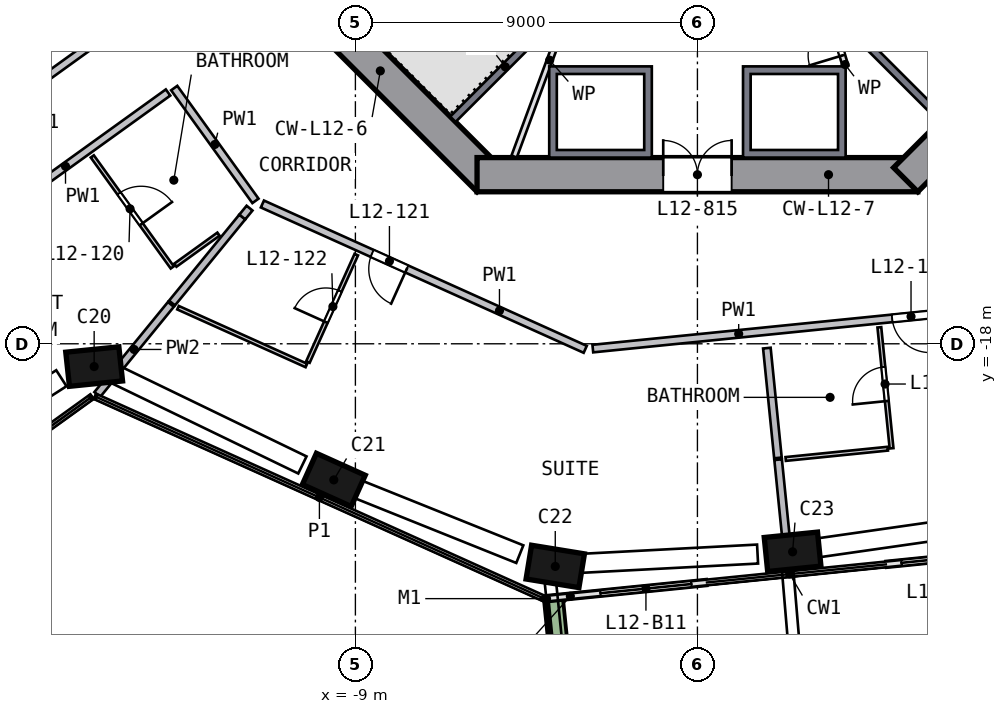
"""IFC4 building model, lengths in metres.
Left out: names, types, materials, properties, quantities, classifications, styles, units other than length and angle.
Written with IfcOpenShell. Run it as: python <this file> out.ifc"""

import sys

from ifc_helpers import new_model, si_unit, direction, frame, frame_2d, origin, origin_2d, place, context, subcontext, project, spatial, polyline, rectangle, outline, extrude, element, fill, save


model = new_model("IFC4")
c1 = context("Model", 3, precision=1e-05, world=origin(), true_north=direction((0.0, 1.0)))
c2 = subcontext(c1, "Body", "Model", "MODEL_VIEW")
j1 = project(units=[si_unit("LENGTHUNIT", "METRE"), si_unit("PLANEANGLEUNIT", "RADIAN")], contexts=[c1])
p1 = place(None, origin())
s1 = spatial("IfcSite", under=j1, at=p1, CompositionType="ELEMENT")
p2 = place(p1, origin())
s2 = spatial("IfcBuilding", under=s1, at=p2, CompositionType="ELEMENT")
p3 = place(p2, frame((0.0, 0.0, 56.5)))
s3 = spatial("IfcBuildingStorey", under=s2, at=p3, CompositionType="ELEMENT", Elevation=56.5)
p4 = place(p3, frame((-15.981, -18.509, 0.0), z_axis=(0.088633967, -0.075255255, 0.993217331), x_axis=(-0.991038531, -0.106704076, 0.080354653)))
e1 = element("IfcColumn", 1, at=p4, inside=s3, PredefinedType="COLUMN", context=c2, shape_type="SweptSolid", body=[
    extrude(rectangle(XDim=1.4, YDim=0.9, at=origin_2d()), origin(), (0.0, 0.0, 1.0), 3.212),
])
p5 = place(p3, frame((-9.693, -21.527, 0.0), z_axis=(0.102744451, -0.045250147, 0.993678017), x_axis=(0.905958686, -0.408210433, -0.112263538)))
e2 = element("IfcColumn", 2, at=p5, inside=s3, PredefinedType="COLUMN", context=c2, shape_type="SweptSolid", body=[
    extrude(rectangle(XDim=1.4, YDim=0.9, at=origin_2d()), origin(), (0.0, 0.0, 1.0), 3.21),
])
p6 = place(p3, frame((-3.878, -23.838, 0.0), z_axis=(0.113509932, -0.01748646, 0.993382967), x_axis=(-0.98048224, 0.159578304, 0.114844864)))
e3 = element("IfcColumn", 3, at=p6, inside=s3, PredefinedType="COLUMN", context=c2, shape_type="SweptSolid", body=[
    extrude(rectangle(XDim=1.4, YDim=0.9, at=origin_2d()), origin(), (0.0, 0.0, 1.0), 3.211),
])
p7 = place(p3, frame((2.369, -23.489, 0.0), z_axis=(0.111641928, 0.012168058, 0.993674), x_axis=(0.988702484, 0.09927897, -0.112299088)))
e4 = element("IfcColumn", 4, at=p7, inside=s3, PredefinedType="COLUMN", context=c2, shape_type="SweptSolid", body=[
    extrude(rectangle(XDim=1.4, YDim=0.9, at=origin_2d()), origin(), (0.0, 0.0, 1.0), 3.21),
])
p8 = place(p3, frame((-13.682, -5.481, 0.0), z_axis=(0.0, 0.0, 1.0), x_axis=(0.707106781, -0.707106781, 0.0)))
e5 = element("IfcWall", 5, at=p8, inside=s3, PredefinedType="SHEAR", context=c2, shape_type="SweptSolid", body=[
    extrude(rectangle(XDim=11.598, YDim=0.9, at=frame_2d((5.799, 0.0))), origin(), (0.0, 0.0, 1.0), 3.5),
])
p9 = place(p8, frame((2.099, 0.0, 0.0)))
e6 = element("IfcOpeningElement", 6, at=p9, cuts=e5, PredefinedType="OPENING", context=c2, shape_type="SweptSolid", body=[
    extrude(rectangle(XDim=1.2, YDim=2.1, at=frame_2d((0.6, 1.05))), frame((0.0, 0.46, 0.0), z_axis=(0.0, -1.0, 0.0), x_axis=(1.0, 0.0, 0.0)), (0.0, 0.0, 1.0), 0.92),
])
p10 = place(p3, frame((-5.799, -13.55, 0.0), z_axis=(0.0, 0.0, 1.0), x_axis=(1.0, 0.0, 0.0)))
e7 = element("IfcWall", 7, at=p10, inside=s3, PredefinedType="SHEAR", context=c2, shape_type="SweptSolid", body=[
    extrude(rectangle(XDim=11.598, YDim=0.9, at=frame_2d((5.799, 0.0))), origin(), (0.0, 0.0, 1.0), 3.5),
])
p11 = place(p10, frame((4.899, 0.0, 0.0)))
e8 = element("IfcOpeningElement", 8, at=p11, cuts=e7, PredefinedType="OPENING", context=c2, shape_type="SweptSolid", body=[
    extrude(rectangle(XDim=1.8, YDim=2.1, at=frame_2d((0.9, 1.05))), frame((0.0, 0.46, 0.0), z_axis=(0.0, -1.0, 0.0), x_axis=(1.0, 0.0, 0.0)), (0.0, 0.0, 1.0), 0.92),
])
p12 = place(p3, frame((5.481, -13.682, 0.0), z_axis=(0.0, 0.0, 1.0), x_axis=(0.707106781, 0.707106781, 0.0)))
e9 = element("IfcWall", 9, at=p12, inside=s3, PredefinedType="SHEAR", context=c2, shape_type="SweptSolid", body=[
    extrude(rectangle(XDim=11.598, YDim=0.9, at=frame_2d((5.799, 0.0))), origin(), (0.0, 0.0, 1.0), 3.5),
])
p13 = place(p12, frame((2.099, 0.0, 0.0)))
e10 = element("IfcOpeningElement", 10, at=p13, cuts=e9, PredefinedType="OPENING", context=c2, shape_type="SweptSolid", body=[
    extrude(rectangle(XDim=1.2, YDim=2.1, at=frame_2d((0.6, 1.05))), frame((0.0, 0.46, 0.0), z_axis=(0.0, -1.0, 0.0), x_axis=(1.0, 0.0, 0.0)), (0.0, 0.0, 1.0), 0.92),
])
p14 = place(p3, frame((-3.94, -24.704, 0.0), z_axis=(0.0, 0.0, 1.0), x_axis=(0.994951039, 0.100361492, 0.0)))
e11 = element("IfcWall", 11, at=p14, inside=s3, PredefinedType="SOLIDWALL", context=c2, shape_type="SweptSolid", body=[
    extrude(rectangle(XDim=4.199, YDim=0.15, at=frame_2d((2.099, 0.0))), origin(), (0.0, 0.0, 1.0), 2.425),
])
p15 = place(p14, frame((1.399, 0.0, 0.0)))
e12 = element("IfcOpeningElement", 12, at=p15, cuts=e11, PredefinedType="OPENING", context=c2, shape_type="SweptSolid", body=[
    extrude(rectangle(XDim=2.4, YDim=2.4, at=frame_2d((1.2, 1.2))), frame((0.0, 0.085, 0.0), z_axis=(0.0, -1.0, 0.0), x_axis=(1.0, 0.0, 0.0)), (0.0, 0.0, 1.0), 0.17),
])
p16 = place(p3, frame((4.972, -23.804, 0.0), z_axis=(0.0, 0.0, 1.0), x_axis=(0.994952518, 0.100346834, 0.0)))
e13 = element("IfcWall", 13, at=p16, inside=s3, PredefinedType="SOLIDWALL", context=c2, shape_type="SweptSolid", body=[
    extrude(rectangle(XDim=3.842, YDim=0.15, at=frame_2d((1.921, 0.0))), origin(), (0.0, 0.0, 1.0), 2.425),
])
p17 = place(p16, frame((0.4, 0.0, 0.0)))
e14 = element("IfcOpeningElement", 14, at=p17, cuts=e13, PredefinedType="OPENING", context=c2, shape_type="SweptSolid", body=[
    extrude(rectangle(XDim=2.4, YDim=2.4, at=frame_2d((1.2, 1.2))), frame((0.0, 0.085, 0.0), z_axis=(0.0, -1.0, 0.0), x_axis=(1.0, 0.0, 0.0)), (0.0, 0.0, 1.0), 0.17),
])
p18 = place(p3, frame((-3.784, -24.764, 0.0), z_axis=(0.0, 0.0, 1.0), x_axis=(0.100357532, -0.994951439, 0.0)))
e15 = element("IfcWall", 15, at=p18, inside=s3, PredefinedType="SOLIDWALL", context=c2, shape_type="SweptSolid", body=[
    extrude(rectangle(XDim=3.199, YDim=0.5, at=frame_2d((1.6, 0.0))), origin(), (0.0, 0.0, 1.0), 0.7),
])
p19 = place(p3, origin())
e16 = element("IfcWall", 16, at=p19, inside=s3, PredefinedType="SOLIDWALL", context=c2, shape_type="SweptSolid", body=[
    extrude(outline(polyline([(-1.2, -13.1), (-3.9, -13.1), (-3.9, -10.7), (-1.2, -10.7), (-1.2, -13.1)]), holes=[polyline([(-3.7, -10.9), (-3.7, -12.9), (-1.4, -12.9), (-1.4, -10.9), (-3.7, -10.9)])]), origin(), (0.0, 0.0, 1.0), 3.19),
])
p20 = place(p3, origin())
e17 = element("IfcWall", 17, at=p20, inside=s3, PredefinedType="SOLIDWALL", context=c2, shape_type="SweptSolid", body=[
    extrude(outline(polyline([(3.9, -10.7), (3.9, -13.1), (1.2, -13.1), (1.2, -10.7), (3.9, -10.7)]), holes=[polyline([(1.4, -12.9), (3.7, -12.9), (3.7, -10.9), (1.4, -10.9), (1.4, -12.9)])]), origin(), (0.0, 0.0, 1.0), 3.19),
])
for number, where, z_axis, x_axis in (
    (18, (-3.677, -9.334, 0.0), (0.0, 0.0, 1.0), (-0.707, -0.707, 0.0)),
    (19, (3.677, -9.334, 0.0), (0.0, 0.0, 1.0), (0.707, -0.707, 0.0)),
):
    element("IfcWall", number, at=place(p3, frame(where, z_axis=z_axis, x_axis=x_axis)), inside=s3, PredefinedType="SOLIDWALL", context=c2, shape_type="SweptSolid", body=[
        extrude(rectangle(XDim=3.9, YDim=0.2, at=frame_2d((1.95, 0.0))), origin(), (0.0, 0.0, 1.0), 3.19),
    ])
p21 = place(p3, frame((3.9, -10.7, 0.0), z_axis=(0.0, 0.0, 1.0), x_axis=(-0.289808785, 0.957084567, 0.0)))
e20 = element("IfcWall", 20, at=p21, inside=s3, PredefinedType="PARTITIONING", context=c2, shape_type="SweptSolid", body=[
    extrude(rectangle(XDim=1.501, YDim=0.15, at=frame_2d((0.75, 0.0))), origin(), (0.0, 0.0, 1.0), 3.19),
])
p22 = place(p21, frame((0.301, 0.0, 0.0)))
e21 = element("IfcOpeningElement", 21, at=p22, cuts=e20, PredefinedType="OPENING", context=c2, shape_type="SweptSolid", body=[
    extrude(rectangle(XDim=0.9, YDim=2.1, at=frame_2d((0.45, 1.05))), frame((0.0, 0.085, 0.0), z_axis=(0.0, -1.0, 0.0), x_axis=(1.0, 0.0, 0.0)), (0.0, 0.0, 1.0), 0.17),
])
p23 = place(p3, frame((-1.776, -4.813, 0.0), z_axis=(0.0, 0.0, 1.0), x_axis=(-0.346112737, -0.93819293, 0.0)))
e22 = element("IfcWall", 22, at=p23, inside=s3, PredefinedType="PARTITIONING", context=c2, shape_type="SweptSolid", body=[
    extrude(rectangle(XDim=8.803, YDim=0.15, at=frame_2d((4.402, 0.0))), origin(), (0.0, 0.0, 1.0), 3.19),
])
p24 = place(p23, frame((1.4, 0.0, 0.0)))
e23 = element("IfcOpeningElement", 23, at=p24, cuts=e22, PredefinedType="OPENING", context=c2, shape_type="SweptSolid", body=[
    extrude(rectangle(XDim=1.8, YDim=2.1, at=frame_2d((0.9, 1.05))), frame((0.0, 0.085, 0.0), z_axis=(0.0, -1.0, 0.0), x_axis=(1.0, 0.0, 0.0)), (0.0, 0.0, 1.0), 0.17),
])
p25 = place(p3, frame((-26.325, -17.603, 0.0), z_axis=(0.0, 0.0, 1.0), x_axis=(0.811471763, 0.584391631, 0.0)))
e24 = element("IfcWall", 24, at=p25, inside=s3, PredefinedType="SOLIDWALL", context=c2, shape_type="SweptSolid", body=[
    extrude(rectangle(XDim=13.691, YDim=0.2, at=frame_2d((6.845, 0.0))), origin(), (0.0, 0.0, 1.0), 3.19),
])
p26 = place(p25, frame((5.85, 0.0, 0.0)))
e25 = element("IfcOpeningElement", 25, at=p26, cuts=e24, PredefinedType="OPENING", context=c2, shape_type="SweptSolid", body=[
    extrude(rectangle(XDim=1.0, YDim=2.1, at=frame_2d((0.5, 1.05))), frame((0.0, 0.11, 0.0), z_axis=(0.0, -1.0, 0.0), x_axis=(1.0, 0.0, 0.0)), (0.0, 0.0, 1.0), 0.22),
])
p27 = place(p3, frame((-13.93, -11.387, 0.0), z_axis=(0.0, 0.0, 1.0), x_axis=(-0.811463307, -0.584403373, 0.0)))
e26 = element("IfcWall", 26, at=p27, inside=s3, PredefinedType="SOLIDWALL", context=c2, shape_type="SweptSolid", body=[
    extrude(rectangle(XDim=13.691, YDim=0.2, at=frame_2d((6.845, 0.0))), origin(), (0.0, 0.0, 1.0), 3.19),
])
p28 = place(p27, frame((12.085, 0.0, 0.0)))
e27 = element("IfcOpeningElement", 27, at=p28, cuts=e26, PredefinedType="OPENING", context=c2, shape_type="SweptSolid", body=[
    extrude(rectangle(XDim=0.9, YDim=2.1, at=frame_2d((0.45, 1.05))), frame((0.0, 0.11, 0.0), z_axis=(0.0, -1.0, 0.0), x_axis=(1.0, 0.0, 0.0)), (0.0, 0.0, 1.0), 0.22),
])
p29 = place(p27, frame((6.85, 0.0, 0.0)))
e28 = element("IfcOpeningElement", 28, at=p29, cuts=e26, PredefinedType="OPENING", context=c2, shape_type="SweptSolid", body=[
    extrude(rectangle(XDim=1.0, YDim=2.1, at=frame_2d((0.5, 1.05))), frame((0.0, 0.11, 0.0), z_axis=(0.0, -1.0, 0.0), x_axis=(1.0, 0.0, 0.0)), (0.0, 0.0, 1.0), 0.22),
])
p30 = place(p3, frame((-13.768, -11.271, 0.0), z_axis=(0.0, 0.0, 1.0), x_axis=(0.58441548, -0.811454587, 0.0)))
e29 = element("IfcWall", 29, at=p30, inside=s3, PredefinedType="SOLIDWALL", context=c2, shape_type="SweptSolid", body=[
    extrude(rectangle(XDim=3.658, YDim=0.2, at=frame_2d((1.829, 0.0))), origin(), (0.0, 0.0, 1.0), 3.19),
])
p31 = place(p3, frame((-2.952, -18.146, 0.0), z_axis=(0.0, 0.0, 1.0), x_axis=(-0.911840581, 0.410544462, 0.0)))
e30 = element("IfcWall", 30, at=p31, inside=s3, PredefinedType="SOLIDWALL", context=c2, shape_type="SweptSolid", body=[
    extrude(rectangle(XDim=9.316, YDim=0.2, at=frame_2d((4.658, 0.0))), origin(), (0.0, 0.0, 1.0), 3.19),
])
p32 = place(p31, frame((5.15, 0.0, 0.0)))
e31 = element("IfcOpeningElement", 31, at=p32, cuts=e30, PredefinedType="OPENING", context=c2, shape_type="SweptSolid", body=[
    extrude(rectangle(XDim=1.0, YDim=2.1, at=frame_2d((0.5, 1.05))), frame((0.0, 0.11, 0.0), z_axis=(0.0, -1.0, 0.0), x_axis=(1.0, 0.0, 0.0)), (0.0, 0.0, 1.0), 0.22),
])
p33 = place(p3, frame((6.317, -17.211, 0.0), z_axis=(0.0, 0.0, 1.0), x_axis=(-0.99494876, -0.100384084, 0.0)))
e32 = element("IfcWall", 32, at=p33, inside=s3, PredefinedType="SOLIDWALL", context=c2, shape_type="SweptSolid", body=[
    extrude(rectangle(XDim=9.115, YDim=0.2, at=frame_2d((4.558, 0.0))), origin(), (0.0, 0.0, 1.0), 3.19),
])
p34 = place(p33, frame((0.2, 0.0, 0.0)))
e33 = element("IfcOpeningElement", 33, at=p34, cuts=e32, PredefinedType="OPENING", context=c2, shape_type="SweptSolid", body=[
    extrude(rectangle(XDim=1.0, YDim=2.1, at=frame_2d((0.5, 1.05))), frame((0.0, 0.11, 0.0), z_axis=(0.0, -1.0, 0.0), x_axis=(1.0, 0.0, 0.0)), (0.0, 0.0, 1.0), 0.22),
])
p35 = place(p3, frame((-13.855, -16.964, 0.0), z_axis=(0.0, 0.0, 1.0), x_axis=(-0.632560086, -0.77451129, 0.0)))
e34 = element("IfcWall", 34, at=p35, inside=s3, PredefinedType="SOLIDWALL", context=c2, shape_type="SweptSolid", body=[
    extrude(rectangle(XDim=3.062, YDim=0.2, at=frame_2d((1.531, 0.0))), origin(), (0.0, 0.0, 1.0), 3.19),
])
p36 = place(p3, frame((-11.976, -14.663, 0.0), z_axis=(0.0, 0.0, 1.0), x_axis=(-0.632623877, -0.774459186, 0.0)))
e35 = element("IfcWall", 35, at=p36, inside=s3, PredefinedType="SOLIDWALL", context=c2, shape_type="SweptSolid", body=[
    extrude(rectangle(XDim=2.925, YDim=0.2, at=frame_2d((1.462, 0.0))), origin(), (0.0, 0.0, 1.0), 3.19),
])
p37 = place(p3, frame((-11.785, -14.43, 0.0), z_axis=(0.0, 0.0, 1.0), x_axis=(-0.63217795, -0.774823231, 0.0)))
e36 = element("IfcWall", 36, at=p37, inside=s3, PredefinedType="SOLIDWALL", context=c2, shape_type="SweptSolid", body=[
    extrude(rectangle(XDim=0.301, YDim=0.2, at=frame_2d((0.151, 0.0))), origin(), (0.0, 0.0, 1.0), 3.19),
])
p38 = place(p3, frame((1.827, -18.114, 0.0), z_axis=(0.0, 0.0, 1.0), x_axis=(0.10036087, -0.994951102, 0.0)))
e37 = element("IfcWall", 37, at=p38, inside=s3, PredefinedType="SOLIDWALL", context=c2, shape_type="SweptSolid", body=[
    extrude(rectangle(XDim=2.905, YDim=0.2, at=frame_2d((1.452, 0.0))), origin(), (0.0, 0.0, 1.0), 3.19),
])
p39 = place(p3, frame((2.123, -21.05, 0.0), z_axis=(0.0, 0.0, 1.0), x_axis=(0.100322558, -0.994954966, 0.0)))
e38 = element("IfcWall", 38, at=p39, inside=s3, PredefinedType="SOLIDWALL", context=c2, shape_type="SweptSolid", body=[
    extrude(rectangle(XDim=2.952, YDim=0.2, at=frame_2d((1.476, 0.0))), origin(), (0.0, 0.0, 1.0), 3.19),
])
p40 = place(p3, frame((-15.923, -13.069, 0.0), z_axis=(0.0, 0.0, 1.0), x_axis=(0.584402985, -0.811463586, 0.0)))
e39 = element("IfcWall", 39, at=p40, inside=s3, PredefinedType="PARTITIONING", context=c2, shape_type="SweptSolid", body=[
    extrude(rectangle(XDim=3.6, YDim=0.1, at=frame_2d((1.8, 0.0))), origin(), (0.0, 0.0, 1.0), 3.19),
])
p41 = place(p40, frame((1.2, 0.0, 0.0)))
e40 = element("IfcOpeningElement", 40, at=p41, cuts=e39, PredefinedType="OPENING", context=c2, shape_type="SweptSolid", body=[
    extrude(rectangle(XDim=1.0, YDim=2.1, at=frame_2d((0.5, 1.05))), frame((0.0, 0.06, 0.0), z_axis=(0.0, -1.0, 0.0), x_axis=(1.0, 0.0, 0.0)), (0.0, 0.0, 1.0), 0.12),
])
p42 = place(p3, frame((-12.603, -15.115, 0.0), z_axis=(0.0, 0.0, 1.0), x_axis=(-0.811415122, -0.584470273, 0.0)))
e41 = element("IfcWall", 41, at=p42, inside=s3, PredefinedType="PARTITIONING", context=c2, shape_type="SweptSolid", body=[
    extrude(rectangle(XDim=1.398, YDim=0.1, at=frame_2d((0.699, 0.0))), origin(), (0.0, 0.0, 1.0), 3.19),
])
p43 = place(p3, frame((-10.29, -18.571, 0.0), z_axis=(0.0, 0.0, 1.0), x_axis=(-0.911830219, 0.410567474, 0.0)))
e42 = element("IfcWall", 42, at=p43, inside=s3, PredefinedType="PARTITIONING", context=c2, shape_type="SweptSolid", body=[
    extrude(rectangle(XDim=3.704, YDim=0.1, at=frame_2d((1.852, 0.0))), origin(), (0.0, 0.0, 1.0), 3.19),
])
p44 = place(p3, frame((-10.249, -18.48, 0.0), z_axis=(0.0, 0.0, 1.0), x_axis=(0.4105546, 0.911836016, 0.0)))
e43 = element("IfcWall", 43, at=p44, inside=s3, PredefinedType="PARTITIONING", context=c2, shape_type="SweptSolid", body=[
    extrude(rectangle(XDim=3.1, YDim=0.1, at=frame_2d((1.55, 0.0))), origin(), (0.0, 0.0, 1.0), 3.19),
])
p45 = place(p44, frame((1.15, 0.0, 0.0)))
e44 = element("IfcOpeningElement", 44, at=p45, cuts=e43, PredefinedType="OPENING", context=c2, shape_type="SweptSolid", body=[
    extrude(rectangle(XDim=0.9, YDim=2.1, at=frame_2d((0.45, 1.05))), frame((0.0, 0.06, 0.0), z_axis=(0.0, -1.0, 0.0), x_axis=(1.0, 0.0, 0.0)), (0.0, 0.0, 1.0), 0.12),
])
p46 = place(p3, frame((5.009, -20.76, 0.0), z_axis=(0.0, 0.0, 1.0), x_axis=(-0.994949967, -0.100372122, 0.0)))
e45 = element("IfcWall", 45, at=p46, inside=s3, PredefinedType="PARTITIONING", context=c2, shape_type="SweptSolid", body=[
    extrude(rectangle(XDim=2.7, YDim=0.1, at=frame_2d((1.35, 0.0))), origin(), (0.0, 0.0, 1.0), 3.19),
])
p47 = place(p3, frame((5.108, -20.75, 0.0), z_axis=(0.0, 0.0, 1.0), x_axis=(-0.100402585, 0.994946894, 0.0)))
e46 = element("IfcWall", 46, at=p47, inside=s3, PredefinedType="PARTITIONING", context=c2, shape_type="SweptSolid", body=[
    extrude(rectangle(XDim=3.2, YDim=0.1, at=frame_2d((1.6, 0.0))), origin(), (0.0, 0.0, 1.0), 3.19),
])
p48 = place(p47, frame((1.25, 0.0, 0.0)))
e47 = element("IfcOpeningElement", 47, at=p48, cuts=e46, PredefinedType="OPENING", context=c2, shape_type="SweptSolid", body=[
    extrude(rectangle(XDim=0.9, YDim=2.1, at=frame_2d((0.45, 1.05))), frame((0.0, 0.06, 0.0), z_axis=(0.0, -1.0, 0.0), x_axis=(1.0, 0.0, 0.0)), (0.0, 0.0, 1.0), 0.12),
])
p49 = place(p15, origin())
e48 = element("IfcDoor", 48, at=p49, inside=s3, OperationType="SLIDING_TO_LEFT", PredefinedType="DOOR", context=c2, shape_type="SweptSolid", body=[
    extrude(rectangle(XDim=2.4, YDim=2.4, at=frame_2d((1.2, 1.2))), frame((0.0, 0.025, 0.0), z_axis=(0.0, -1.0, 0.0), x_axis=(1.0, 0.0, 0.0)), (0.0, 0.0, 1.0), 0.05),
])
fill(e12, e48)
p50 = place(p17, origin())
e49 = element("IfcDoor", 49, at=p50, inside=s3, OperationType="SLIDING_TO_RIGHT", PredefinedType="DOOR", context=c2, shape_type="SweptSolid", body=[
    extrude(rectangle(XDim=2.4, YDim=2.4, at=frame_2d((1.2, 1.2))), frame((0.0, 0.025, 0.0), z_axis=(0.0, -1.0, 0.0), x_axis=(1.0, 0.0, 0.0)), (0.0, 0.0, 1.0), 0.05),
])
fill(e14, e49)
p51 = place(p11, origin())
e50 = element("IfcDoor", 50, at=p51, inside=s3, OperationType="DOUBLE_DOOR_SINGLE_SWING", PredefinedType="DOOR", context=c2, shape_type="SweptSolid", body=[
    extrude(rectangle(XDim=1.8, YDim=2.1, at=frame_2d((0.9, 1.05))), frame((0.0, 0.025, 0.0), z_axis=(0.0, -1.0, 0.0), x_axis=(1.0, 0.0, 0.0)), (0.0, 0.0, 1.0), 0.05),
])
fill(e8, e50)
p52 = place(p22, origin())
e51 = element("IfcDoor", 51, at=p52, inside=s3, OperationType="SINGLE_SWING_LEFT", PredefinedType="DOOR", context=c2, shape_type="SweptSolid", body=[
    extrude(rectangle(XDim=0.9, YDim=2.1, at=frame_2d((0.45, 1.05))), frame((0.0, 0.025, 0.0), z_axis=(0.0, -1.0, 0.0), x_axis=(1.0, 0.0, 0.0)), (0.0, 0.0, 1.0), 0.05),
])
fill(e21, e51)
p53 = place(p41, origin())
e52 = element("IfcDoor", 52, at=p53, inside=s3, OperationType="SINGLE_SWING_RIGHT", PredefinedType="DOOR", context=c2, shape_type="SweptSolid", body=[
    extrude(rectangle(XDim=1.0, YDim=2.1, at=frame_2d((0.5, 1.05))), frame((0.0, 0.025, 0.0), z_axis=(0.0, -1.0, 0.0), x_axis=(1.0, 0.0, 0.0)), (0.0, 0.0, 1.0), 0.05),
])
fill(e40, e52)
p54 = place(p32, origin())
e53 = element("IfcDoor", 53, at=p54, inside=s3, OperationType="SINGLE_SWING_LEFT", PredefinedType="DOOR", context=c2, shape_type="SweptSolid", body=[
    extrude(rectangle(XDim=1.0, YDim=2.1, at=frame_2d((0.5, 1.05))), frame((0.0, 0.025, 0.0), z_axis=(0.0, -1.0, 0.0), x_axis=(1.0, 0.0, 0.0)), (0.0, 0.0, 1.0), 0.05),
])
fill(e31, e53)
p55 = place(p45, origin())
e54 = element("IfcDoor", 54, at=p55, inside=s3, OperationType="SINGLE_SWING_LEFT", PredefinedType="DOOR", context=c2, shape_type="SweptSolid", body=[
    extrude(rectangle(XDim=0.9, YDim=2.1, at=frame_2d((0.45, 1.05))), frame((0.0, 0.025, 0.0), z_axis=(0.0, -1.0, 0.0), x_axis=(1.0, 0.0, 0.0)), (0.0, 0.0, 1.0), 0.05),
])
fill(e44, e54)
p56 = place(p34, origin())
e55 = element("IfcDoor", 55, at=p56, inside=s3, OperationType="SINGLE_SWING_LEFT", PredefinedType="DOOR", context=c2, shape_type="SweptSolid", body=[
    extrude(rectangle(XDim=1.0, YDim=2.1, at=frame_2d((0.5, 1.05))), frame((0.0, 0.025, 0.0), z_axis=(0.0, -1.0, 0.0), x_axis=(1.0, 0.0, 0.0)), (0.0, 0.0, 1.0), 0.05),
])
fill(e33, e55)
p57 = place(p48, origin())
e56 = element("IfcDoor", 56, at=p57, inside=s3, OperationType="SINGLE_SWING_LEFT", PredefinedType="DOOR", context=c2, shape_type="SweptSolid", body=[
    extrude(rectangle(XDim=0.9, YDim=2.1, at=frame_2d((0.45, 1.05))), frame((0.0, 0.025, 0.0), z_axis=(0.0, -1.0, 0.0), x_axis=(1.0, 0.0, 0.0)), (0.0, 0.0, 1.0), 0.05),
])
fill(e47, e56)
save(model, sys.argv[1])
